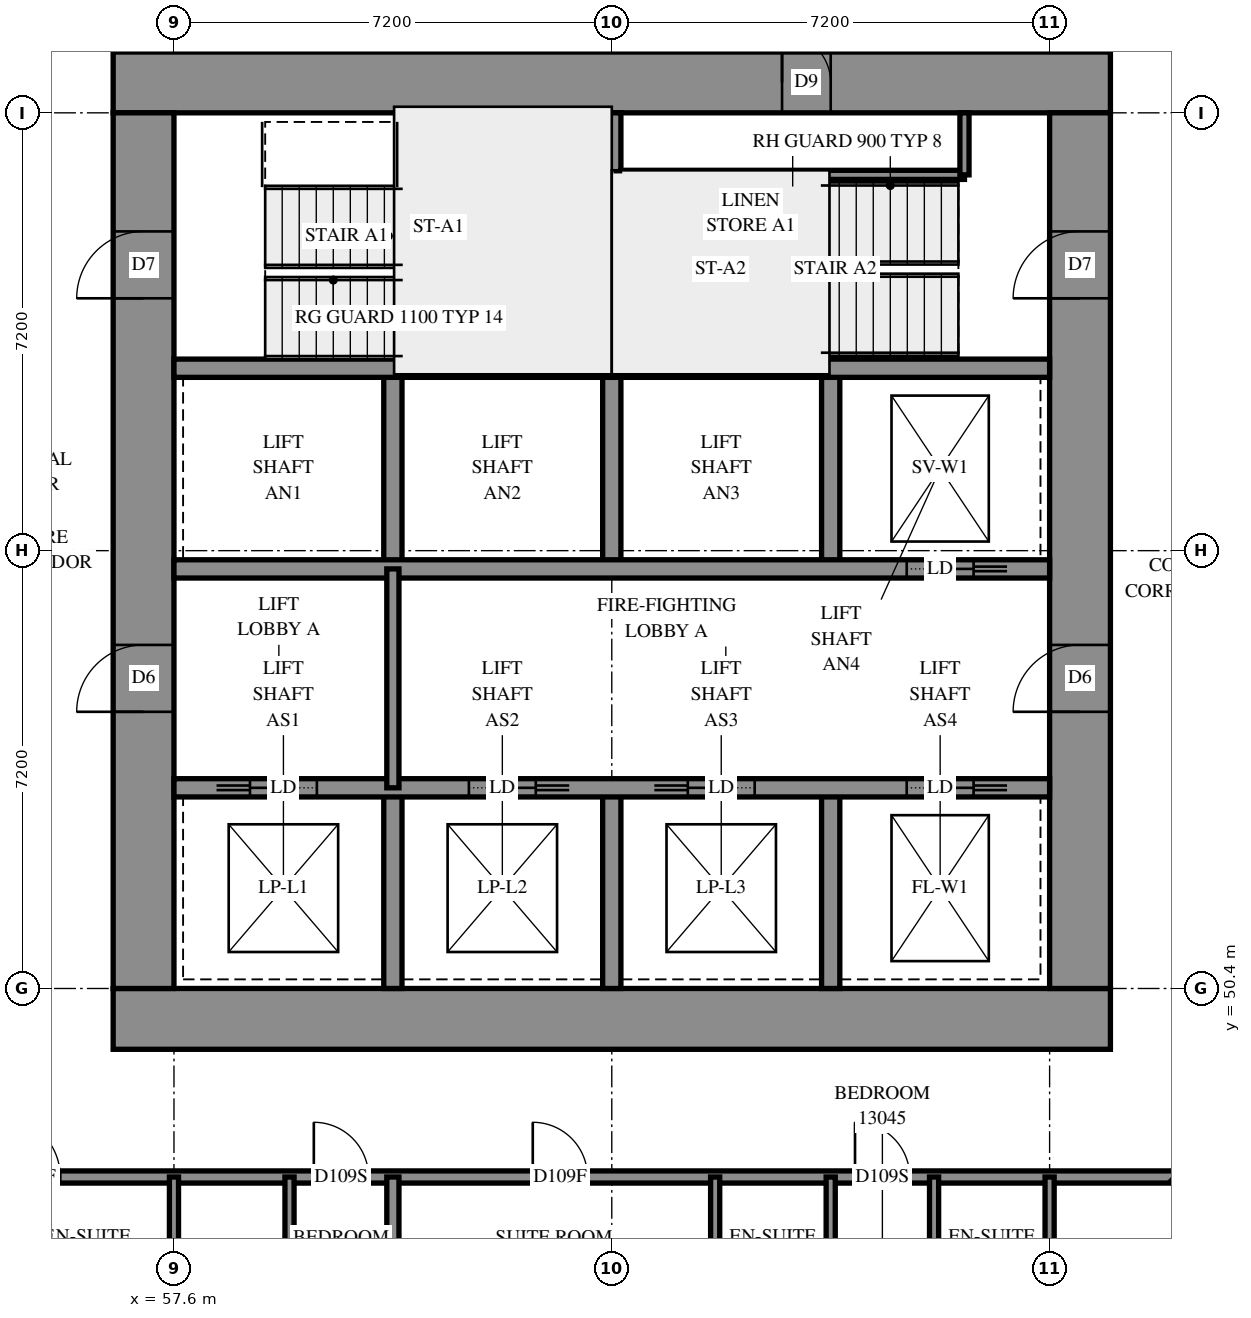
"""IFC4 building model, lengths in metres.
Left out: names, types, materials, properties, quantities, classifications, styles, units other than length and angle.
Written with IfcOpenShell. Run it as: python <this file> out.ifc"""

import sys

from ifc_helpers import new_model, si_unit, direction, frame, frame_2d, origin, place, context, subcontext, project, spatial, rectangle, extrude, element, fill, save


model = new_model("IFC4")
c1 = context("Model", 3, precision=1e-05, world=origin(), true_north=direction((0.0, 1.0)))
c2 = subcontext(c1, "Body", "Model", "MODEL_VIEW")
j1 = project(units=[si_unit("LENGTHUNIT", "METRE"), si_unit("PLANEANGLEUNIT", "RADIAN")], contexts=[c1])
p1 = place(None, origin())
s1 = spatial("IfcSite", under=j1, at=p1, CompositionType="ELEMENT")
p2 = place(p1, origin())
s2 = spatial("IfcBuilding", under=s1, at=p2, CompositionType="ELEMENT")
p3 = place(p2, frame((0.0, 0.0, 50.8)))
s3 = spatial("IfcBuildingStorey", under=s2, at=p3, CompositionType="ELEMENT", Elevation=50.8)
p4 = place(p3, frame((56.6, 49.9, -0.3), z_axis=(0.0, 0.0, 1.0), x_axis=(1.0, 0.0, 0.0)))
e1 = element("IfcWall", 1, at=p4, inside=s3, PredefinedType="SHEAR", context=c2, shape_type="SweptSolid", body=[
    extrude(rectangle(XDim=16.4, YDim=1.0, at=frame_2d((8.2, 0.0))), origin(), (0.0, 0.0, 1.0), 2.7),
])
p5 = place(p3, frame((56.6, 65.3, -0.3), z_axis=(0.0, 0.0, 1.0), x_axis=(1.0, 0.0, 0.0)))
e2 = element("IfcWall", 2, at=p5, inside=s3, PredefinedType="SHEAR", context=c2, shape_type="SweptSolid", body=[
    extrude(rectangle(XDim=16.4, YDim=1.0, at=frame_2d((8.2, 0.0))), origin(), (0.0, 0.0, 1.0), 2.7),
])
p6 = place(p5, frame((11.0, 0.0, 0.3)))
e3 = element("IfcOpeningElement", 3, at=p6, cuts=e2, PredefinedType="OPENING", context=c2, shape_type="SweptSolid", body=[
    extrude(rectangle(XDim=0.8, YDim=2.1, at=frame_2d((0.4, 1.05))), frame((0.0, 0.51, 0.0), z_axis=(0.0, -1.0, 0.0), x_axis=(1.0, 0.0, 0.0)), (0.0, 0.0, 1.0), 1.02),
])
p7 = place(p3, frame((57.1, 50.4, -0.3), z_axis=(0.0, 0.0, 1.0), x_axis=(0.0, 1.0, 0.0)))
e4 = element("IfcWall", 4, at=p7, inside=s3, PredefinedType="SHEAR", context=c2, shape_type="SweptSolid", body=[
    extrude(rectangle(XDim=14.4, YDim=1.0, at=frame_2d((7.2, 0.0))), origin(), (0.0, 0.0, 1.0), 2.7),
])
p8 = place(p7, frame((4.55, 0.0, 0.3)))
e5 = element("IfcOpeningElement", 5, at=p8, cuts=e4, PredefinedType="OPENING", context=c2, shape_type="SweptSolid", body=[
    extrude(rectangle(XDim=1.1, YDim=2.1, at=frame_2d((0.55, 1.05))), frame((0.0, 0.51, 0.0), z_axis=(0.0, -1.0, 0.0), x_axis=(1.0, 0.0, 0.0)), (0.0, 0.0, 1.0), 1.02),
])
p9 = place(p7, frame((11.35, 0.0, 0.3)))
e6 = element("IfcOpeningElement", 6, at=p9, cuts=e4, PredefinedType="OPENING", context=c2, shape_type="SweptSolid", body=[
    extrude(rectangle(XDim=1.1, YDim=2.1, at=frame_2d((0.55, 1.05))), frame((0.0, 0.51, 0.0), z_axis=(0.0, -1.0, 0.0), x_axis=(1.0, 0.0, 0.0)), (0.0, 0.0, 1.0), 1.02),
])
p10 = place(p3, frame((72.5, 50.4, -0.3), z_axis=(0.0, 0.0, 1.0), x_axis=(0.0, 1.0, 0.0)))
e7 = element("IfcWall", 7, at=p10, inside=s3, PredefinedType="SHEAR", context=c2, shape_type="SweptSolid", body=[
    extrude(rectangle(XDim=14.4, YDim=1.0, at=frame_2d((7.2, 0.0))), origin(), (0.0, 0.0, 1.0), 2.7),
])
p11 = place(p10, frame((4.55, 0.0, 0.3)))
e8 = element("IfcOpeningElement", 8, at=p11, cuts=e7, PredefinedType="OPENING", context=c2, shape_type="SweptSolid", body=[
    extrude(rectangle(XDim=1.1, YDim=2.1, at=frame_2d((0.55, 1.05))), frame((0.0, 0.51, 0.0), z_axis=(0.0, -1.0, 0.0), x_axis=(1.0, 0.0, 0.0)), (0.0, 0.0, 1.0), 1.02),
])
p12 = place(p10, frame((11.35, 0.0, 0.3)))
e9 = element("IfcOpeningElement", 9, at=p12, cuts=e7, PredefinedType="OPENING", context=c2, shape_type="SweptSolid", body=[
    extrude(rectangle(XDim=1.1, YDim=2.1, at=frame_2d((0.55, 1.05))), frame((0.0, 0.51, 0.0), z_axis=(0.0, -1.0, 0.0), x_axis=(1.0, 0.0, 0.0)), (0.0, 0.0, 1.0), 1.02),
])
for number, where, z_axis, x_axis in (
    (10, (61.2, 50.4, 0.0), (0.0, 0.0, 1.0), (0.0, 1.0, 0.0)),
    (11, (61.2, 57.3, 0.0), (0.0, 0.0, 1.0), (0.0, 1.0, 0.0)),
    (12, (64.8, 50.4, 0.0), (0.0, 0.0, 1.0), (0.0, 1.0, 0.0)),
    (13, (64.8, 57.3, 0.0), (0.0, 0.0, 1.0), (0.0, 1.0, 0.0)),
    (14, (68.4, 50.4, 0.0), (0.0, 0.0, 1.0), (0.0, 1.0, 0.0)),
    (15, (68.4, 57.3, 0.0), (0.0, 0.0, 1.0), (0.0, 1.0, 0.0)),
):
    element("IfcWall", number, at=place(p3, frame(where, z_axis=z_axis, x_axis=x_axis)), inside=s3, PredefinedType="SOLIDWALL", context=c2, shape_type="SweptSolid", body=[
        extrude(rectangle(XDim=3.3, YDim=0.3, at=frame_2d((1.65, 0.0))), origin(), (0.0, 0.0, 1.0), 3.1),
    ])
p13 = place(p3, frame((57.6, 53.7, 0.0), z_axis=(0.0, 0.0, 1.0), x_axis=(1.0, 0.0, 0.0)))
e16 = element("IfcWall", 16, at=p13, inside=s3, PredefinedType="SOLIDWALL", context=c2, shape_type="SweptSolid", body=[
    extrude(rectangle(XDim=14.4, YDim=0.3, at=frame_2d((7.2, 0.0))), origin(), (0.0, 0.0, 1.0), 3.1),
])
p14 = place(p13, frame((1.25, 0.0, 0.0)))
e17 = element("IfcOpeningElement", 17, at=p14, cuts=e16, PredefinedType="OPENING", context=c2, shape_type="SweptSolid", body=[
    extrude(rectangle(XDim=1.1, YDim=2.1, at=frame_2d((0.55, 1.05))), frame((0.0, 0.16, 0.0), z_axis=(0.0, -1.0, 0.0), x_axis=(1.0, 0.0, 0.0)), (0.0, 0.0, 1.0), 0.32),
])
p15 = place(p13, frame((4.85, 0.0, 0.0)))
e18 = element("IfcOpeningElement", 18, at=p15, cuts=e16, PredefinedType="OPENING", context=c2, shape_type="SweptSolid", body=[
    extrude(rectangle(XDim=1.1, YDim=2.1, at=frame_2d((0.55, 1.05))), frame((0.0, 0.16, 0.0), z_axis=(0.0, -1.0, 0.0), x_axis=(1.0, 0.0, 0.0)), (0.0, 0.0, 1.0), 0.32),
])
p16 = place(p13, frame((8.45, 0.0, 0.0)))
e19 = element("IfcOpeningElement", 19, at=p16, cuts=e16, PredefinedType="OPENING", context=c2, shape_type="SweptSolid", body=[
    extrude(rectangle(XDim=1.1, YDim=2.1, at=frame_2d((0.55, 1.05))), frame((0.0, 0.16, 0.0), z_axis=(0.0, -1.0, 0.0), x_axis=(1.0, 0.0, 0.0)), (0.0, 0.0, 1.0), 0.32),
])
p17 = place(p13, frame((12.05, 0.0, 0.0)))
e20 = element("IfcOpeningElement", 20, at=p17, cuts=e16, PredefinedType="OPENING", context=c2, shape_type="SweptSolid", body=[
    extrude(rectangle(XDim=1.1, YDim=2.1, at=frame_2d((0.55, 1.05))), frame((0.0, 0.16, 0.0), z_axis=(0.0, -1.0, 0.0), x_axis=(1.0, 0.0, 0.0)), (0.0, 0.0, 1.0), 0.32),
])
p18 = place(p3, frame((57.6, 57.3, 0.0), z_axis=(0.0, 0.0, 1.0), x_axis=(1.0, 0.0, 0.0)))
e21 = element("IfcWall", 21, at=p18, inside=s3, PredefinedType="SOLIDWALL", context=c2, shape_type="SweptSolid", body=[
    extrude(rectangle(XDim=14.4, YDim=0.3, at=frame_2d((7.2, 0.0))), origin(), (0.0, 0.0, 1.0), 3.1),
])
p19 = place(p18, frame((12.05, 0.0, 0.0)))
e22 = element("IfcOpeningElement", 22, at=p19, cuts=e21, PredefinedType="OPENING", context=c2, shape_type="SweptSolid", body=[
    extrude(rectangle(XDim=1.1, YDim=2.1, at=frame_2d((0.55, 1.05))), frame((0.0, 0.16, 0.0), z_axis=(0.0, -1.0, 0.0), x_axis=(1.0, 0.0, 0.0)), (0.0, 0.0, 1.0), 0.32),
])
for number, where, z_axis, x_axis in (
    (23, (57.6, 60.6, 0.0), (0.0, 0.0, 1.0), (1.0, 0.0, 0.0)),
    (24, (64.8, 60.6, 0.0), (0.0, 0.0, 1.0), (1.0, 0.0, 0.0)),
):
    element("IfcWall", number, at=place(p3, frame(where, z_axis=z_axis, x_axis=x_axis)), inside=s3, PredefinedType="SOLIDWALL", context=c2, shape_type="SweptSolid", body=[
        extrude(rectangle(XDim=7.2, YDim=0.3, at=frame_2d((3.6, 0.0))), origin(), (0.0, 0.0, 1.0), 3.1),
    ])
p20 = place(p3, frame((64.8, 60.6, 0.0), z_axis=(0.0, 0.0, 1.0), x_axis=(0.0, 1.0, 0.0)))
e25 = element("IfcWall", 25, at=p20, inside=s3, PredefinedType="SOLIDWALL", context=c2, shape_type="SweptSolid", body=[
    extrude(rectangle(XDim=4.2, YDim=0.3, at=frame_2d((2.1, 0.0))), origin(), (0.0, 0.0, 1.0), 3.1),
])
p21 = place(p3, frame((64.95, 63.78, 0.0), z_axis=(0.0, 0.0, 1.0), x_axis=(1.0, 0.0, 0.0)))
e26 = element("IfcWall", 26, at=p21, inside=s3, PredefinedType="PARTITIONING", context=c2, shape_type="SweptSolid", body=[
    extrude(rectangle(XDim=5.65, YDim=0.15, at=frame_2d((2.825, 0.0))), origin(), (0.0, 0.0, 1.0), 3.1),
])
p22 = place(p3, frame((70.6, 63.78, 0.0), z_axis=(0.0, 0.0, 1.0), x_axis=(0.0, 1.0, 0.0)))
e27 = element("IfcWall", 27, at=p22, inside=s3, PredefinedType="PARTITIONING", context=c2, shape_type="SweptSolid", body=[
    extrude(rectangle(XDim=1.02, YDim=0.15, at=frame_2d((0.51, 0.0))), origin(), (0.0, 0.0, 1.0), 3.1),
])
p23 = place(p3, frame((61.2, 53.7, 0.0), z_axis=(0.0, 0.0, 1.0), x_axis=(0.0, 1.0, 0.0)))
e28 = element("IfcWall", 28, at=p23, inside=s3, PredefinedType="PARTITIONING", context=c2, shape_type="SweptSolid", body=[
    extrude(rectangle(XDim=3.6, YDim=0.2, at=frame_2d((1.8, 0.0))), origin(), (0.0, 0.0, 1.0), 3.1),
])
p24 = place(p3, frame((54.5, 47.3, 0.0), z_axis=(0.0, 0.0, 1.0), x_axis=(1.0, 0.0, 0.0)))
e29 = element("IfcWall", 29, at=p24, inside=s3, PredefinedType="PARTITIONING", context=c2, shape_type="SweptSolid", body=[
    extrude(rectangle(XDim=19.56, YDim=0.2, at=frame_2d((9.78, 0.0))), origin(), (0.0, 0.0, 1.0), 3.1),
])
p25 = place(p24, frame((0.23, 0.0, 0.0)))
e30 = element("IfcOpeningElement", 30, at=p25, cuts=e29, PredefinedType="OPENING", context=c2, shape_type="SweptSolid", body=[
    extrude(rectangle(XDim=1.0, YDim=2.1, at=frame_2d((0.5, 1.05))), frame((0.0, 0.11, 0.0), z_axis=(0.0, -1.0, 0.0), x_axis=(1.0, 0.0, 0.0)), (0.0, 0.0, 1.0), 0.22),
])
p26 = place(p24, frame((5.4, 0.0, 0.0)))
e31 = element("IfcOpeningElement", 31, at=p26, cuts=e29, PredefinedType="OPENING", context=c2, shape_type="SweptSolid", body=[
    extrude(rectangle(XDim=0.9, YDim=2.1, at=frame_2d((0.45, 1.05))), frame((0.0, 0.11, 0.0), z_axis=(0.0, -1.0, 0.0), x_axis=(1.0, 0.0, 0.0)), (0.0, 0.0, 1.0), 0.22),
])
p27 = place(p24, frame((9.001, 0.0, 0.0)))
e32 = element("IfcOpeningElement", 32, at=p27, cuts=e29, PredefinedType="OPENING", context=c2, shape_type="SweptSolid", body=[
    extrude(rectangle(XDim=0.9, YDim=2.1, at=frame_2d((0.45, 1.05))), frame((0.0, 0.11, 0.0), z_axis=(0.0, -1.0, 0.0), x_axis=(1.0, 0.0, 0.0)), (0.0, 0.0, 1.0), 0.22),
])
p28 = place(p24, frame((14.3, 0.0, 0.0)))
e33 = element("IfcOpeningElement", 33, at=p28, cuts=e29, PredefinedType="OPENING", context=c2, shape_type="SweptSolid", body=[
    extrude(rectangle(XDim=0.9, YDim=2.1, at=frame_2d((0.45, 1.05))), frame((0.0, 0.11, 0.0), z_axis=(0.0, -1.0, 0.0), x_axis=(1.0, 0.0, 0.0)), (0.0, 0.0, 1.0), 0.22),
])
p29 = place(p3, frame((61.2, 42.291, 0.0), z_axis=(0.0, 0.0, 1.0), x_axis=(0.0, 1.0, 0.0)))
e34 = element("IfcWall", 34, at=p29, inside=s3, PredefinedType="PARTITIONING", context=c2, shape_type="SweptSolid", body=[
    extrude(rectangle(XDim=5.009, YDim=0.2, at=frame_2d((2.504, 0.0))), origin(), (0.0, 0.0, 1.0), 3.1),
])
p30 = place(p3, frame((74.057, 47.297, 0.0), z_axis=(0.0, 0.0, 1.0), x_axis=(0.7071067812, -0.7071067812, 0.0)))
e35 = element("IfcWall", 35, at=p30, inside=s3, PredefinedType="PARTITIONING", context=c2, shape_type="SweptSolid", body=[
    extrude(rectangle(XDim=4.653, YDim=0.2, at=frame_2d((2.326, 0.0))), origin(), (0.0, 0.0, 1.0), 3.1),
])
p31 = place(p30, frame((0.57, 0.0, 0.0)))
e36 = element("IfcOpeningElement", 36, at=p31, cuts=e35, PredefinedType="OPENING", context=c2, shape_type="SweptSolid", body=[
    extrude(rectangle(XDim=1.0, YDim=2.1, at=frame_2d((0.5, 1.05))), frame((0.0, 0.11, 0.0), z_axis=(0.0, -1.0, 0.0), x_axis=(1.0, 0.0, 0.0)), (0.0, 0.0, 1.0), 0.22),
])
for number, where, z_axis, x_axis in (
    (37, (59.5, 44.9, 0.0), (0.0, 0.0, 1.0), (0.0, 1.0, 0.0)),
    (38, (57.6, 44.9, 0.0), (0.0, 0.0, 1.0), (0.0, 1.0, 0.0)),
    (39, (66.5, 44.9, 0.0), (0.0, 0.0, 1.0), (0.0, 1.0, 0.0)),
    (40, (68.4, 44.9, 0.0), (0.0, 0.0, 1.0), (0.0, 1.0, 0.0)),
    (41, (70.1, 44.9, 0.0), (0.0, 0.0, 1.0), (0.0, 1.0, 0.0)),
    (42, (72.0, 44.9, 0.0), (0.0, 0.0, 1.0), (0.0, 1.0, 0.0)),
):
    element("IfcWall", number, at=place(p3, frame(where, z_axis=z_axis, x_axis=x_axis)), inside=s3, PredefinedType="PARTITIONING", context=c2, shape_type="SweptSolid", body=[
        extrude(rectangle(XDim=2.4, YDim=0.15, at=frame_2d((1.2, 0.0))), origin(), (0.0, 0.0, 1.0), 3.1),
    ])
p32 = place(p6, origin())
e43 = element("IfcDoor", 43, at=p32, inside=s3, OperationType="SINGLE_SWING_RIGHT", PredefinedType="DOOR", context=c2, shape_type="SweptSolid", body=[
    extrude(rectangle(XDim=0.8, YDim=2.1, at=frame_2d((0.4, 1.05))), frame((0.0, -0.44, 0.0), z_axis=(0.0, -1.0, 0.0), x_axis=(1.0, 0.0, 0.0)), (0.0, 0.0, 1.0), 0.05),
])
fill(e3, e43)
p33 = place(p8, origin())
e44 = element("IfcDoor", 44, at=p33, inside=s3, OperationType="DOUBLE_DOOR_SINGLE_SWING", PredefinedType="DOOR", context=c2, shape_type="SweptSolid", body=[
    extrude(rectangle(XDim=1.1, YDim=2.1, at=frame_2d((0.55, 1.05))), frame((0.0, 0.025, 0.0), z_axis=(0.0, -1.0, 0.0), x_axis=(1.0, 0.0, 0.0)), (0.0, 0.0, 1.0), 0.05),
])
fill(e5, e44)
p34 = place(p11, origin())
e45 = element("IfcDoor", 45, at=p34, inside=s3, OperationType="DOUBLE_DOOR_SINGLE_SWING", PredefinedType="DOOR", context=c2, shape_type="SweptSolid", body=[
    extrude(rectangle(XDim=1.1, YDim=2.1, at=frame_2d((0.55, 1.05))), frame((0.0, 0.025, 0.0), z_axis=(0.0, -1.0, 0.0), x_axis=(1.0, 0.0, 0.0)), (0.0, 0.0, 1.0), 0.05),
])
fill(e8, e45)
p35 = place(p9, origin())
e46 = element("IfcDoor", 46, at=p35, inside=s3, OperationType="SINGLE_SWING_LEFT", PredefinedType="DOOR", context=c2, shape_type="SweptSolid", body=[
    extrude(rectangle(XDim=1.1, YDim=2.1, at=frame_2d((0.55, 1.05))), frame((0.0, 0.025, 0.0), z_axis=(0.0, -1.0, 0.0), x_axis=(1.0, 0.0, 0.0)), (0.0, 0.0, 1.0), 0.05),
])
fill(e6, e46)
p36 = place(p12, origin())
e47 = element("IfcDoor", 47, at=p36, inside=s3, OperationType="SINGLE_SWING_RIGHT", PredefinedType="DOOR", context=c2, shape_type="SweptSolid", body=[
    extrude(rectangle(XDim=1.1, YDim=2.1, at=frame_2d((0.55, 1.05))), frame((0.0, 0.025, 0.0), z_axis=(0.0, -1.0, 0.0), x_axis=(1.0, 0.0, 0.0)), (0.0, 0.0, 1.0), 0.05),
])
fill(e9, e47)
p37 = place(p14, origin())
e48 = element("IfcDoor", 48, at=p37, inside=s3, OperationType="SLIDING_TO_LEFT", PredefinedType="DOOR", context=c2, shape_type="SweptSolid", body=[
    extrude(rectangle(XDim=1.1, YDim=2.1, at=frame_2d((0.55, 1.05))), frame((0.0, 0.025, 0.0), z_axis=(0.0, -1.0, 0.0), x_axis=(1.0, 0.0, 0.0)), (0.0, 0.0, 1.0), 0.05),
])
fill(e17, e48)
p38 = place(p15, origin())
e49 = element("IfcDoor", 49, at=p38, inside=s3, OperationType="SLIDING_TO_RIGHT", PredefinedType="DOOR", context=c2, shape_type="SweptSolid", body=[
    extrude(rectangle(XDim=1.1, YDim=2.1, at=frame_2d((0.55, 1.05))), frame((0.0, 0.025, 0.0), z_axis=(0.0, -1.0, 0.0), x_axis=(1.0, 0.0, 0.0)), (0.0, 0.0, 1.0), 0.05),
])
fill(e18, e49)
p39 = place(p16, origin())
e50 = element("IfcDoor", 50, at=p39, inside=s3, OperationType="SLIDING_TO_LEFT", PredefinedType="DOOR", context=c2, shape_type="SweptSolid", body=[
    extrude(rectangle(XDim=1.1, YDim=2.1, at=frame_2d((0.55, 1.05))), frame((0.0, 0.025, 0.0), z_axis=(0.0, -1.0, 0.0), x_axis=(1.0, 0.0, 0.0)), (0.0, 0.0, 1.0), 0.05),
])
fill(e19, e50)
p40 = place(p17, origin())
e51 = element("IfcDoor", 51, at=p40, inside=s3, OperationType="SLIDING_TO_RIGHT", PredefinedType="DOOR", context=c2, shape_type="SweptSolid", body=[
    extrude(rectangle(XDim=1.1, YDim=2.1, at=frame_2d((0.55, 1.05))), frame((0.0, 0.025, 0.0), z_axis=(0.0, -1.0, 0.0), x_axis=(1.0, 0.0, 0.0)), (0.0, 0.0, 1.0), 0.05),
])
fill(e20, e51)
p41 = place(p19, origin())
e52 = element("IfcDoor", 52, at=p41, inside=s3, OperationType="SLIDING_TO_RIGHT", PredefinedType="DOOR", context=c2, shape_type="SweptSolid", body=[
    extrude(rectangle(XDim=1.1, YDim=2.1, at=frame_2d((0.55, 1.05))), frame((0.0, 0.025, 0.0), z_axis=(0.0, -1.0, 0.0), x_axis=(1.0, 0.0, 0.0)), (0.0, 0.0, 1.0), 0.05),
])
fill(e22, e52)
p42 = place(p25, origin())
e53 = element("IfcDoor", 53, at=p42, inside=s3, OperationType="SINGLE_SWING_RIGHT", PredefinedType="DOOR", context=c2, shape_type="SweptSolid", body=[
    extrude(rectangle(XDim=1.0, YDim=2.1, at=frame_2d((0.5, 1.05))), frame((0.0, 0.025, 0.0), z_axis=(0.0, -1.0, 0.0), x_axis=(1.0, 0.0, 0.0)), (0.0, 0.0, 1.0), 0.05),
])
fill(e30, e53)
p43 = place(p26, origin())
e54 = element("IfcDoor", 54, at=p43, inside=s3, OperationType="SINGLE_SWING_LEFT", PredefinedType="DOOR", context=c2, shape_type="SweptSolid", body=[
    extrude(rectangle(XDim=0.9, YDim=2.1, at=frame_2d((0.45, 1.05))), frame((0.0, 0.025, 0.0), z_axis=(0.0, -1.0, 0.0), x_axis=(1.0, 0.0, 0.0)), (0.0, 0.0, 1.0), 0.05),
])
fill(e31, e54)
p44 = place(p27, origin())
e55 = element("IfcDoor", 55, at=p44, inside=s3, OperationType="SINGLE_SWING_RIGHT", PredefinedType="DOOR", context=c2, shape_type="SweptSolid", body=[
    extrude(rectangle(XDim=0.9, YDim=2.1, at=frame_2d((0.45, 1.05))), frame((0.0, 0.025, 0.0), z_axis=(0.0, -1.0, 0.0), x_axis=(1.0, 0.0, 0.0)), (0.0, 0.0, 1.0), 0.05),
])
fill(e32, e55)
p45 = place(p28, origin())
e56 = element("IfcDoor", 56, at=p45, inside=s3, OperationType="SINGLE_SWING_RIGHT", PredefinedType="DOOR", context=c2, shape_type="SweptSolid", body=[
    extrude(rectangle(XDim=0.9, YDim=2.1, at=frame_2d((0.45, 1.05))), frame((0.0, 0.025, 0.0), z_axis=(0.0, -1.0, 0.0), x_axis=(1.0, 0.0, 0.0)), (0.0, 0.0, 1.0), 0.05),
])
fill(e33, e56)
save(model, sys.argv[1])
